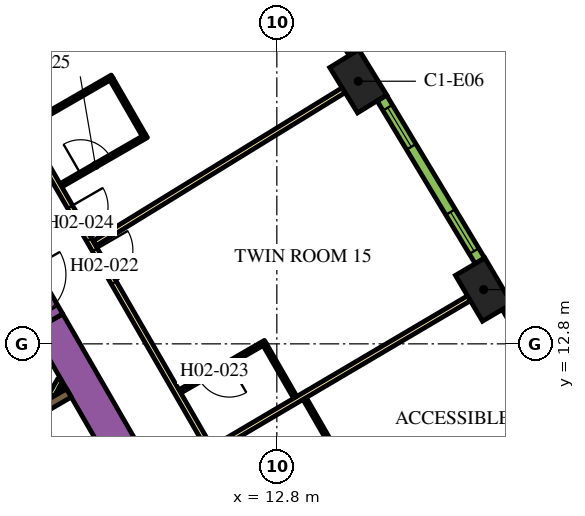
"""IFC4 building model, lengths in metres.
Left out: names, types, materials, properties, quantities, classifications, styles, units other than length and angle.
Written with IfcOpenShell. Run it as: python <this file> out.ifc"""

import sys

from ifc_helpers import new_model, si_unit, direction, frame, frame_2d, origin, origin_2d, place, context, subcontext, project, spatial, polyline, rectangle, outline, extrude, element, fill, save


model = new_model("IFC4")
c1 = context("Model", 3, precision=1e-05, world=origin(), true_north=direction((0.0, 1.0)))
c2 = subcontext(c1, "Body", "Model", "MODEL_VIEW")
j1 = project(units=[si_unit("LENGTHUNIT", "METRE"), si_unit("PLANEANGLEUNIT", "RADIAN")], contexts=[c1])
p1 = place(None, origin())
s1 = spatial("IfcSite", under=j1, at=p1, CompositionType="ELEMENT")
p2 = place(p1, origin())
s2 = spatial("IfcBuilding", under=s1, at=p2, CompositionType="ELEMENT")
p3 = place(p2, frame((0.0, 0.0, 43.2)))
s3 = spatial("IfcBuildingStorey", under=s2, at=p3, CompositionType="ELEMENT", Elevation=43.2)
for number, where, z_axis, x_axis in (
    (1, (18.243, 14.228, 0.0), (0.0, 0.0, 1.0), (-0.508, 0.861, 0.0)),
    (2, (14.942, 19.71, 0.0), (0.0, 0.0, 1.0), (-0.524, 0.852, 0.0)),
):
    element("IfcColumn", number, at=place(p3, frame(where, z_axis=z_axis, x_axis=x_axis)), inside=s3, PredefinedType="COLUMN", context=c2, shape_type="SweptSolid", body=[
        extrude(rectangle(XDim=1.4, YDim=0.9, at=origin_2d()), origin(), (0.0, 0.0, 1.0), 3.9),
    ])
p4 = place(p3, frame((6.776, 13.364, 0.0), z_axis=(0.0, 0.0, 1.0), x_axis=(0.500004177138, -0.8660229921, 0.0)))
e3 = element("IfcWall", 3, at=p4, inside=s3, PredefinedType="SOLIDWALL", context=c2, shape_type="SweptSolid", body=[
    extrude(rectangle(XDim=20.204, YDim=0.9, at=frame_2d((10.102, 0.0))), origin(), (0.0, 0.0, 1.0), 3.9),
])
p5 = place(p3, origin())
e4 = element("IfcWall", 4, at=p5, inside=s3, PredefinedType="SOLIDWALL", context=c2, shape_type="SweptSolid", body=[
    extrude(outline(polyline([(5.27, 10.173), (5.27, 10.173), (4.683, 9.834), (4.504, 9.731), (4.442, 9.839), (4.431, 9.856), (4.419, 9.871), (4.406, 9.885), (4.39, 9.898), (4.374, 9.909), (4.357, 9.918), (4.341, 9.925), (7.266, 11.614), (7.391, 11.398), (5.486, 10.298), (5.486, 10.298), (5.27, 10.173), (5.27, 10.173)])), origin(), (0.0, 0.0, 1.0), 3.9),
])
p6 = place(p3, frame((6.872, 11.45, 0.0), z_axis=(0.0, 0.0, 1.0), x_axis=(0.499846793097, 0.866113839764, 0.0)))
e5 = element("IfcWall", 5, at=p6, inside=s3, PredefinedType="PARTITIONING", context=c2, shape_type="SweptSolid", body=[
    extrude(rectangle(XDim=0.453, YDim=0.15, at=frame_2d((0.227, 0.0))), origin(), (0.0, 0.0, 1.0), 2.75),
])
p7 = place(p3, frame((7.131, 11.6, 0.0), z_axis=(0.0, 0.0, 1.0), x_axis=(0.498600033135, 0.866832167699, 0.0)))
e6 = element("IfcWall", 6, at=p7, inside=s3, PredefinedType="PARTITIONING", context=c2, shape_type="SweptSolid", body=[
    extrude(rectangle(XDim=0.107, YDim=0.15, at=frame_2d((0.053, 0.0))), origin(), (0.0, 0.0, 1.0), 2.75),
])
p8 = place(p3, frame((5.926, 14.836, 0.0), z_axis=(0.0, 0.0, 1.0), x_axis=(0.500062241894, -0.865989465428, 0.0)))
e7 = element("IfcWall", 7, at=p8, inside=s3, PredefinedType="SOLIDWALL", context=c2, shape_type="SweptSolid", body=[
    extrude(rectangle(XDim=1.7, YDim=0.9, at=frame_2d((0.85, 0.0))), origin(), (0.0, 0.0, 1.0), 3.9),
])
p9 = place(p8, frame((0.25, 0.0, 0.0)))
e8 = element("IfcOpeningElement", 8, at=p9, cuts=e7, PredefinedType="OPENING", context=c2, shape_type="SweptSolid", body=[
    extrude(rectangle(XDim=1.2, YDim=2.1, at=frame_2d((0.6, 1.05))), frame((0.0, 0.46, 0.0), z_axis=(0.0, -1.0, 0.0), x_axis=(1.0, 0.0, 0.0)), (0.0, 0.0, 1.0), 0.92),
])
p10 = place(p3, frame((6.163, 18.475, 0.0), z_axis=(0.0, 0.0, 1.0), x_axis=(0.500001317485, -0.866024643133, 0.0)))
e9 = element("IfcWall", 9, at=p10, inside=s3, PredefinedType="PARTITIONING", context=c2, shape_type="SweptSolid", body=[
    extrude(rectangle(XDim=25.767, YDim=0.15, at=frame_2d((12.883, 0.0))), origin(), (0.0, 0.0, 1.0), 2.75),
])
p11 = place(p10, frame((24.586, 0.0, 0.0)))
e10 = element("IfcOpeningElement", 10, at=p11, cuts=e9, PredefinedType="OPENING", context=c2, shape_type="SweptSolid", body=[
    extrude(rectangle(XDim=1.0, YDim=2.1, at=frame_2d((0.5, 1.05))), frame((0.0, 0.085, 0.0), z_axis=(0.0, -1.0, 0.0), x_axis=(1.0, 0.0, 0.0)), (0.0, 0.0, 1.0), 0.17),
])
p12 = place(p10, frame((16.196, 0.0, 0.0)))
e11 = element("IfcOpeningElement", 11, at=p12, cuts=e9, PredefinedType="OPENING", context=c2, shape_type="SweptSolid", body=[
    extrude(rectangle(XDim=1.0, YDim=2.1, at=frame_2d((0.5, 1.05))), frame((0.0, 0.085, 0.0), z_axis=(0.0, -1.0, 0.0), x_axis=(1.0, 0.0, 0.0)), (0.0, 0.0, 1.0), 0.17),
])
p13 = place(p10, frame((14.789, 0.0, 0.0)))
e12 = element("IfcOpeningElement", 12, at=p13, cuts=e9, PredefinedType="OPENING", context=c2, shape_type="SweptSolid", body=[
    extrude(rectangle(XDim=1.1, YDim=2.1, at=frame_2d((0.55, 1.05))), frame((0.0, 0.085, 0.0), z_axis=(0.0, -1.0, 0.0), x_axis=(1.0, 0.0, 0.0)), (0.0, 0.0, 1.0), 0.17),
])
p14 = place(p10, frame((3.698, 0.0, 0.0)))
e13 = element("IfcOpeningElement", 13, at=p14, cuts=e9, PredefinedType="OPENING", context=c2, shape_type="SweptSolid", body=[
    extrude(rectangle(XDim=1.0, YDim=2.1, at=frame_2d((0.5, 1.05))), frame((0.0, 0.085, 0.0), z_axis=(0.0, -1.0, 0.0), x_axis=(1.0, 0.0, 0.0)), (0.0, 0.0, 1.0), 0.17),
])
p15 = place(p10, frame((2.391, 0.0, 0.0)))
e14 = element("IfcOpeningElement", 14, at=p15, cuts=e9, PredefinedType="OPENING", context=c2, shape_type="SweptSolid", body=[
    extrude(rectangle(XDim=1.0, YDim=2.1, at=frame_2d((0.5, 1.05))), frame((0.0, 0.085, 0.0), z_axis=(0.0, -1.0, 0.0), x_axis=(1.0, 0.0, 0.0)), (0.0, 0.0, 1.0), 0.17),
])
p16 = place(p3, frame((11.16, 24.888, 0.0), z_axis=(0.0, 0.0, 1.0), x_axis=(-0.84199813156, -0.539480441211, 0.0)))
e15 = element("IfcWall", 15, at=p16, inside=s3, PredefinedType="PARTITIONING", context=c2, shape_type="SweptSolid", body=[
    extrude(rectangle(XDim=11.638, YDim=0.15, at=frame_2d((5.819, 0.0))), origin(), (0.0, 0.0, 1.0), 2.75),
])
p17 = place(p3, frame((14.558, 19.475, 0.0), z_axis=(0.0, 0.0, 1.0), x_axis=(-0.851829455142, -0.523819223925, 0.0)))
e16 = element("IfcWall", 16, at=p17, inside=s3, PredefinedType="PARTITIONING", context=c2, shape_type="SweptSolid", body=[
    extrude(rectangle(XDim=7.688, YDim=0.15, at=frame_2d((3.844, 0.0))), origin(), (0.0, 0.0, 1.0), 2.75),
])
p18 = place(p3, frame((17.856, 13.999, 0.0), z_axis=(0.0, 0.0, 1.0), x_axis=(-0.861371519381, -0.507975497047, 0.0)))
e17 = element("IfcWall", 17, at=p18, inside=s3, PredefinedType="PARTITIONING", context=c2, shape_type="SweptSolid", body=[
    extrude(rectangle(XDim=7.804, YDim=0.15, at=frame_2d((3.902, 0.0))), origin(), (0.0, 0.0, 1.0), 2.75),
])
p19 = place(p3, frame((14.759, 9.237, 0.0), z_axis=(0.0, 0.0, 1.0), x_axis=(-0.499943856944, 0.866057815567, 0.0)))
e18 = element("IfcWall", 18, at=p19, inside=s3, PredefinedType="PARTITIONING", context=c2, shape_type="SweptSolid", body=[
    extrude(rectangle(XDim=2.45, YDim=0.1, at=frame_2d((1.225, 0.0))), origin(), (0.0, 0.0, 1.0), 2.75),
])
p20 = place(p3, frame((12.5, 12.849, 0.0), z_axis=(0.0, 0.0, 1.0), x_axis=(-0.866021400173, -0.500006934395, 0.0)))
e19 = element("IfcWall", 19, at=p20, inside=s3, PredefinedType="PARTITIONING", context=c2, shape_type="SweptSolid", body=[
    extrude(rectangle(XDim=2.6, YDim=0.1, at=frame_2d((1.3, 0.0))), origin(), (0.0, 0.0, 1.0), 2.75),
])
p21 = place(p20, frame((1.1, 0.0, 0.0)))
e20 = element("IfcOpeningElement", 20, at=p21, cuts=e19, PredefinedType="OPENING", context=c2, shape_type="SweptSolid", body=[
    extrude(rectangle(XDim=0.9, YDim=2.1, at=frame_2d((0.45, 1.05))), frame((0.0, 0.06, 0.0), z_axis=(0.0, -1.0, 0.0), x_axis=(1.0, 0.0, 0.0)), (0.0, 0.0, 1.0), 0.12),
])
p22 = place(p3, frame((12.482, 12.781, 0.0), z_axis=(0.0, 0.0, 1.0), x_axis=(0.500061482766, -0.865989903783, 0.0)))
e21 = element("IfcWall", 21, at=p22, inside=s3, PredefinedType="PARTITIONING", context=c2, shape_type="SweptSolid", body=[
    extrude(rectangle(XDim=1.6, YDim=0.1, at=frame_2d((0.8, 0.0))), origin(), (0.0, 0.0, 1.0), 2.75),
])
p23 = place(p3, frame((7.118, 16.971, 0.0), z_axis=(0.0, 0.0, 1.0), x_axis=(0.866021400173, 0.500006934395, 0.0)))
e22 = element("IfcWall", 22, at=p23, inside=s3, PredefinedType="PARTITIONING", context=c2, shape_type="SweptSolid", body=[
    extrude(rectangle(XDim=2.6, YDim=0.1, at=frame_2d((1.3, 0.0))), origin(), (0.0, 0.0, 1.0), 2.75),
])
p24 = place(p23, frame((0.6, 0.0, 0.0)))
e23 = element("IfcOpeningElement", 23, at=p24, cuts=e22, PredefinedType="OPENING", context=c2, shape_type="SweptSolid", body=[
    extrude(rectangle(XDim=0.9, YDim=2.1, at=frame_2d((0.45, 1.05))), frame((0.0, 0.06, 0.0), z_axis=(0.0, -1.0, 0.0), x_axis=(1.0, 0.0, 0.0)), (0.0, 0.0, 1.0), 0.12),
])
p25 = place(p3, frame((9.302, 18.289, 0.0), z_axis=(0.0, 0.0, 1.0), x_axis=(-0.500062241894, 0.865989465428, 0.0)))
e24 = element("IfcWall", 24, at=p25, inside=s3, PredefinedType="PARTITIONING", context=c2, shape_type="SweptSolid", body=[
    extrude(rectangle(XDim=1.7, YDim=0.1, at=frame_2d((0.85, 0.0))), origin(), (0.0, 0.0, 1.0), 2.75),
])
p26 = place(p3, frame((6.218, 18.53, 0.0), z_axis=(0.0, 0.0, 1.0), x_axis=(0.865997922154, 0.500047596559, 0.0)))
e25 = element("IfcWall", 25, at=p26, inside=s3, PredefinedType="PARTITIONING", context=c2, shape_type="SweptSolid", body=[
    extrude(rectangle(XDim=2.6, YDim=0.1, at=frame_2d((1.3, 0.0))), origin(), (0.0, 0.0, 1.0), 2.75),
])
p27 = place(p3, frame((21.357, 9.445, 0.0), z_axis=(0.0, 0.0, 1.0), x_axis=(-0.50002123722, 0.866013142123, 0.0)))
e26 = element("IfcWall", 26, at=p27, inside=s3, PredefinedType="SOLIDWALL", context=c2, shape_type="SweptSolid", body=[
    extrude(rectangle(XDim=4.998, YDim=0.29, at=frame_2d((2.499, 0.0))), origin(), (0.0, 0.0, 1.0), 3.65),
])
p28 = place(p27, frame((0.297, 0.0, 0.9)))
e27 = element("IfcOpeningElement", 27, at=p28, cuts=e26, PredefinedType="OPENING", context=c2, shape_type="SweptSolid", body=[
    extrude(rectangle(XDim=1.2, YDim=2.15, at=frame_2d((0.6, 1.075))), frame((0.0, 0.155, 0.0), z_axis=(0.0, -1.0, 0.0), x_axis=(1.0, 0.0, 0.0)), (0.0, 0.0, 1.0), 0.31),
])
p29 = place(p27, frame((3.501, 0.0, 0.9)))
e28 = element("IfcOpeningElement", 28, at=p29, cuts=e26, PredefinedType="OPENING", context=c2, shape_type="SweptSolid", body=[
    extrude(rectangle(XDim=1.2, YDim=2.15, at=frame_2d((0.6, 1.075))), frame((0.0, 0.155, 0.0), z_axis=(0.0, -1.0, 0.0), x_axis=(1.0, 0.0, 0.0)), (0.0, 0.0, 1.0), 0.31),
])
p30 = place(p3, frame((18.143, 14.986, 0.0), z_axis=(0.0, 0.0, 1.0), x_axis=(-0.515938796285, 0.856625448191, 0.0)))
e29 = element("IfcWall", 29, at=p30, inside=s3, PredefinedType="SOLIDWALL", context=c2, shape_type="SweptSolid", body=[
    extrude(rectangle(XDim=4.998, YDim=0.29, at=frame_2d((2.499, 0.0))), origin(), (0.0, 0.0, 1.0), 3.65),
])
p31 = place(p30, frame((0.297, 0.0, 0.9)))
e30 = element("IfcOpeningElement", 30, at=p31, cuts=e29, PredefinedType="OPENING", context=c2, shape_type="SweptSolid", body=[
    extrude(rectangle(XDim=1.2, YDim=2.15, at=frame_2d((0.6, 1.075))), frame((0.0, 0.155, 0.0), z_axis=(0.0, -1.0, 0.0), x_axis=(1.0, 0.0, 0.0)), (0.0, 0.0, 1.0), 0.31),
])
p32 = place(p30, frame((3.501, 0.0, 0.9)))
e31 = element("IfcOpeningElement", 31, at=p32, cuts=e29, PredefinedType="OPENING", context=c2, shape_type="SweptSolid", body=[
    extrude(rectangle(XDim=1.2, YDim=2.15, at=frame_2d((0.6, 1.075))), frame((0.0, 0.155, 0.0), z_axis=(0.0, -1.0, 0.0), x_axis=(1.0, 0.0, 0.0)), (0.0, 0.0, 1.0), 0.31),
])
p33 = place(p3, frame((14.827, 20.466, 0.0), z_axis=(0.0, 0.0, 1.0), x_axis=(-0.531688286542, 0.846940119462, 0.0)))
e32 = element("IfcWall", 32, at=p33, inside=s3, PredefinedType="SOLIDWALL", context=c2, shape_type="SweptSolid", body=[
    extrude(rectangle(XDim=4.998, YDim=0.29, at=frame_2d((2.499, 0.0))), origin(), (0.0, 0.0, 1.0), 3.65),
])
p34 = place(p33, frame((0.297, 0.0, 0.9)))
e33 = element("IfcOpeningElement", 33, at=p34, cuts=e32, PredefinedType="OPENING", context=c2, shape_type="SweptSolid", body=[
    extrude(rectangle(XDim=1.2, YDim=2.15, at=frame_2d((0.6, 1.075))), frame((0.0, 0.155, 0.0), z_axis=(0.0, -1.0, 0.0), x_axis=(1.0, 0.0, 0.0)), (0.0, 0.0, 1.0), 0.31),
])
p35 = place(p33, frame((3.501, 0.0, 0.9)))
e34 = element("IfcOpeningElement", 34, at=p35, cuts=e32, PredefinedType="OPENING", context=c2, shape_type="SweptSolid", body=[
    extrude(rectangle(XDim=1.2, YDim=2.15, at=frame_2d((0.6, 1.075))), frame((0.0, 0.155, 0.0), z_axis=(0.0, -1.0, 0.0), x_axis=(1.0, 0.0, 0.0)), (0.0, 0.0, 1.0), 0.31),
])
p36 = place(p14, origin())
e35 = element("IfcDoor", 35, at=p36, inside=s3, OperationType="SINGLE_SWING_LEFT", PredefinedType="DOOR", context=c2, shape_type="SweptSolid", body=[
    extrude(rectangle(XDim=1.0, YDim=2.1, at=frame_2d((0.5, 1.05))), frame((0.0, 0.025, 0.0), z_axis=(0.0, -1.0, 0.0), x_axis=(1.0, 0.0, 0.0)), (0.0, 0.0, 1.0), 0.05),
])
fill(e13, e35)
p37 = place(p21, origin())
e36 = element("IfcDoor", 36, at=p37, inside=s3, OperationType="SINGLE_SWING_RIGHT", PredefinedType="DOOR", context=c2, shape_type="SweptSolid", body=[
    extrude(rectangle(XDim=0.9, YDim=2.1, at=frame_2d((0.45, 1.05))), frame((0.0, 0.025, 0.0), z_axis=(0.0, -1.0, 0.0), x_axis=(1.0, 0.0, 0.0)), (0.0, 0.0, 1.0), 0.05),
])
fill(e20, e36)
p38 = place(p15, origin())
e37 = element("IfcDoor", 37, at=p38, inside=s3, OperationType="SINGLE_SWING_RIGHT", PredefinedType="DOOR", context=c2, shape_type="SweptSolid", body=[
    extrude(rectangle(XDim=1.0, YDim=2.1, at=frame_2d((0.5, 1.05))), frame((0.0, 0.025, 0.0), z_axis=(0.0, -1.0, 0.0), x_axis=(1.0, 0.0, 0.0)), (0.0, 0.0, 1.0), 0.05),
])
fill(e14, e37)
p39 = place(p24, origin())
e38 = element("IfcDoor", 38, at=p39, inside=s3, OperationType="SINGLE_SWING_LEFT", PredefinedType="DOOR", context=c2, shape_type="SweptSolid", body=[
    extrude(rectangle(XDim=0.9, YDim=2.1, at=frame_2d((0.45, 1.05))), frame((0.0, 0.025, 0.0), z_axis=(0.0, -1.0, 0.0), x_axis=(1.0, 0.0, 0.0)), (0.0, 0.0, 1.0), 0.05),
])
fill(e23, e38)
p40 = place(p31, origin())
e39 = element("IfcWindow", 39, at=p40, inside=s3, PartitioningType="DOUBLE_PANEL_VERTICAL", PredefinedType="WINDOW", context=c2, shape_type="SweptSolid", body=[
    extrude(rectangle(XDim=1.2, YDim=2.15, at=frame_2d((0.6, 1.075))), frame((0.0, 0.015, 0.0), z_axis=(0.0, -1.0, 0.0), x_axis=(1.0, 0.0, 0.0)), (0.0, 0.0, 1.0), 0.06),
])
fill(e30, e39)
p41 = place(p32, origin())
e40 = element("IfcWindow", 40, at=p41, inside=s3, PartitioningType="DOUBLE_PANEL_VERTICAL", PredefinedType="WINDOW", context=c2, shape_type="SweptSolid", body=[
    extrude(rectangle(XDim=1.2, YDim=2.15, at=frame_2d((0.6, 1.075))), frame((0.0, 0.015, 0.0), z_axis=(0.0, -1.0, 0.0), x_axis=(1.0, 0.0, 0.0)), (0.0, 0.0, 1.0), 0.06),
])
fill(e31, e40)
save(model, sys.argv[1])
